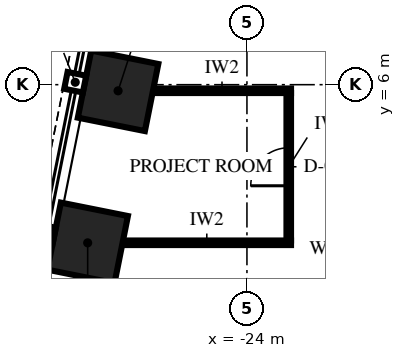
"""IFC4 building model, lengths in metres.
Left out: names, types, materials, properties, quantities, classifications, styles, units other than length and angle.
Written with IfcOpenShell. Run it as: python <this file> out.ifc"""

import sys

from ifc_helpers import new_model, si_unit, direction, frame, frame_2d, origin, origin_2d, place, context, subcontext, project, spatial, rectangle, extrude, element, fill, save


model = new_model("IFC4")
c1 = context("Model", 3, precision=1e-05, world=origin(), true_north=direction((0.0, 1.0)))
c2 = subcontext(c1, "Body", "Model", "MODEL_VIEW")
j1 = project(units=[si_unit("LENGTHUNIT", "METRE"), si_unit("PLANEANGLEUNIT", "RADIAN")], contexts=[c1])
p1 = place(None, origin())
s1 = spatial("IfcSite", under=j1, at=p1, CompositionType="ELEMENT")
p2 = place(p1, origin())
s2 = spatial("IfcBuilding", under=s1, at=p2, CompositionType="ELEMENT")
p3 = place(p2, frame((0.0, 0.0, 127.0)))
s3 = spatial("IfcBuildingStorey", under=s2, at=p3, CompositionType="ELEMENT", Elevation=127.0)
for number, where, z_axis, x_axis in (
    (1, (-27.391, 5.838, 0.0), (0.0, 0.0, 1.0), (-0.196, -0.981, 0.0)),
    (2, (-28.191, 1.838, 0.0), (0.0, 0.0, 1.0), (-0.196, -0.981, 0.0)),
):
    element("IfcColumn", number, at=place(p3, frame(where, z_axis=z_axis, x_axis=x_axis)), inside=s3, PredefinedType="COLUMN", context=c2, shape_type="SweptSolid", body=[
        extrude(rectangle(XDim=1.8, YDim=1.8, at=origin_2d()), origin(), (0.0, 0.0, 1.0), 4.0),
    ])
p4 = place(p3, frame((-27.273, 1.84, 0.0), z_axis=(0.0, 0.0, 1.0), x_axis=(1.0, 0.0, 0.0)))
e3 = element("IfcWall", 3, at=p4, inside=s3, PredefinedType="PARTITIONING", context=c2, shape_type="SweptSolid", body=[
    extrude(rectangle(XDim=4.433, YDim=0.12, at=frame_2d((2.216, 0.0))), origin(), (0.0, 0.0, 1.0), 3.25),
])
p5 = place(p3, frame((-26.473, 5.84, 0.0), z_axis=(0.0, 0.0, 1.0), x_axis=(1.0, 0.0, 0.0)))
e4 = element("IfcWall", 4, at=p5, inside=s3, PredefinedType="PARTITIONING", context=c2, shape_type="SweptSolid", body=[
    extrude(rectangle(XDim=3.633, YDim=0.12, at=frame_2d((1.816, 0.0))), origin(), (0.0, 0.0, 1.0), 2.842),
])
p6 = place(p3, frame((-22.9, 1.9, 0.0), z_axis=(0.0, 0.0, 1.0), x_axis=(0.0, 1.0, 0.0)))
e5 = element("IfcWall", 5, at=p6, inside=s3, PredefinedType="PARTITIONING", context=c2, shape_type="SweptSolid", body=[
    extrude(rectangle(XDim=3.88, YDim=0.12, at=frame_2d((1.94, 0.0))), origin(), (0.0, 0.0, 1.0), 3.85),
])
p7 = place(p6, frame((1.44, 0.0, 0.0)))
e6 = element("IfcOpeningElement", 6, at=p7, cuts=e5, PredefinedType="OPENING", context=c2, shape_type="SweptSolid", body=[
    extrude(rectangle(XDim=1.0, YDim=2.4, at=frame_2d((0.5, 1.2))), frame((0.0, 0.075, 0.0), z_axis=(0.0, -1.0, 0.0), x_axis=(1.0, 0.0, 0.0)), (0.0, 0.0, 1.0), 0.15),
])
p8 = place(p7, origin())
e7 = element("IfcDoor", 7, at=p8, inside=s3, OperationType="SINGLE_SWING_RIGHT", PredefinedType="DOOR", context=c2, shape_type="SweptSolid", body=[
    extrude(rectangle(XDim=1.0, YDim=2.4, at=frame_2d((0.5, 1.2))), frame((0.0, 0.06, 0.0), z_axis=(0.0, -1.0, 0.0), x_axis=(1.0, 0.0, 0.0)), (0.0, 0.0, 1.0), 0.12),
])
fill(e6, e7)
save(model, sys.argv[1])
